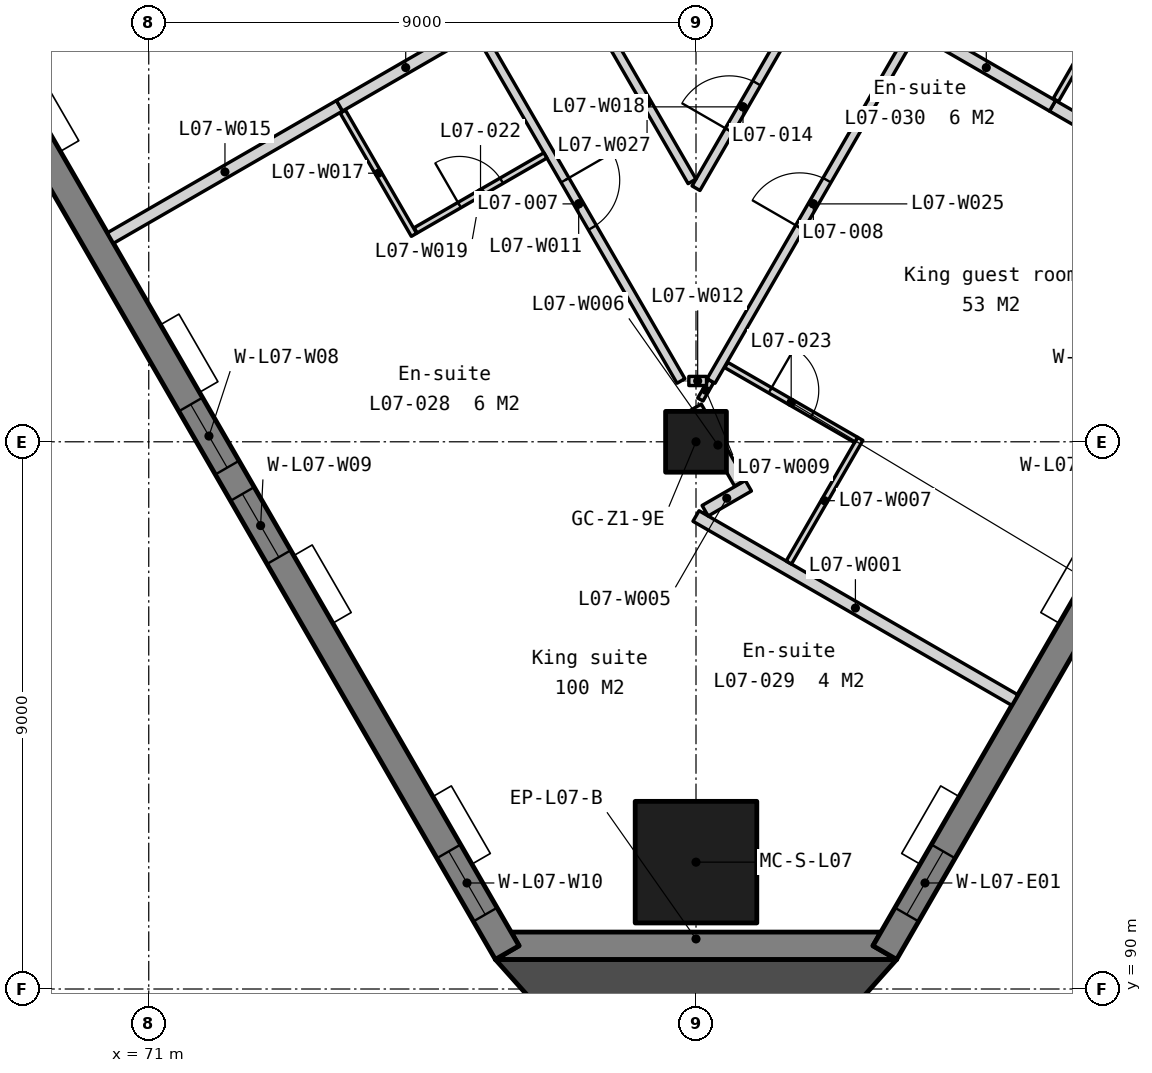
"""IFC4 building model, lengths in metres.
Left out: names, types, materials, properties, quantities, classifications, styles, units other than length and angle.
Written with IfcOpenShell. Run it as: python <this file> out.ifc"""

import sys

from ifc_helpers import new_model, si_unit, direction, frame, frame_2d, origin, origin_2d, place, context, subcontext, project, spatial, polyline, rectangle, outline, extrude, element, fill, save


model = new_model("IFC4")
c1 = context("Model", 3, precision=1e-05, world=origin(), true_north=direction((0.0, 1.0)))
c2 = subcontext(c1, "Body", "Model", "MODEL_VIEW")
j1 = project(units=[si_unit("LENGTHUNIT", "METRE"), si_unit("PLANEANGLEUNIT", "RADIAN")], contexts=[c1])
p1 = place(None, origin())
s1 = spatial("IfcSite", under=j1, at=p1, CompositionType="ELEMENT")
p2 = place(p1, origin())
s2 = spatial("IfcBuilding", under=s1, at=p2, CompositionType="ELEMENT")
p3 = place(p2, frame((0.0, 0.0, 38.5)))
s3 = spatial("IfcBuildingStorey", under=s2, at=p3, CompositionType="ELEMENT", Elevation=38.5)
p4 = place(p3, frame((80.0, 99.0, 0.0), z_axis=(0.0, 0.0, 1.0), x_axis=(1.0, 0.0, 0.0)))
e1 = element("IfcColumn", 1, at=p4, inside=s3, PredefinedType="COLUMN", context=c2, shape_type="SweptSolid", body=[
    extrude(rectangle(XDim=1.0, YDim=1.0, at=origin_2d()), origin(), (0.0, 0.0, 1.0), 3.5),
])
p5 = place(p3, frame((80.0, 92.086, 0.0), z_axis=(0.0, 0.0, 1.0), x_axis=(1.0, 0.0, 0.0)))
e2 = element("IfcColumn", 2, at=p5, inside=s3, PredefinedType="COLUMN", context=c2, shape_type="SweptSolid", body=[
    extrude(rectangle(XDim=2.0, YDim=2.0, at=origin_2d()), origin(), (0.0, 0.0, 1.0), 3.5),
])
p6 = place(p3, frame((0.0, 0.0, -0.15)))
e3 = element("IfcWall", 3, at=p6, inside=s3, PredefinedType="SOLIDWALL", context=c2, shape_type="SweptSolid", body=[
    extrude(outline(polyline([(76.7, 90.486), (77.09, 90.711), (76.96, 90.936), (83.04, 90.936), (82.91, 90.711), (83.3, 90.486), (76.7, 90.486)])), origin(), (0.0, 0.0, 1.0), 3.5),
])
p7 = place(p3, frame((54.495, 129.397, -0.15), z_axis=(0.0, 0.0, 1.0), x_axis=(0.499999201451, -0.866025864826, 0.0)))
e4 = element("IfcWall", 4, at=p7, inside=s3, PredefinedType="SOLIDWALL", context=c2, shape_type="SweptSolid", body=[
    extrude(outline(polyline([(44.8, 0.0), (44.8, 3.5), (0.0, 3.5), (0.0, 0.0), (44.8, 0.0)])), frame((0.0, 0.225, 0.0), z_axis=(0.0, -1.0, 0.0), x_axis=(1.0, 0.0, 0.0)), (0.0, 0.0, 1.0), 0.45),
])
p8 = place(p7, frame((0.722, 0.0, 1.05)))
e5 = element("IfcOpeningElement", 5, at=p8, cuts=e4, PredefinedType="OPENING", context=c2, shape_type="SweptSolid", body=[
    extrude(rectangle(XDim=1.2, YDim=1.5, at=frame_2d((0.6, 0.75))), frame((0.0, 0.235, 0.0), z_axis=(0.0, -1.0, 0.0), x_axis=(1.0, 0.0, 0.0)), (0.0, 0.0, 1.0), 0.47),
])
p9 = place(p7, frame((7.51, 0.0, 1.05)))
e6 = element("IfcOpeningElement", 6, at=p9, cuts=e4, PredefinedType="OPENING", context=c2, shape_type="SweptSolid", body=[
    extrude(rectangle(XDim=1.2, YDim=1.5, at=frame_2d((0.6, 0.75))), frame((0.0, 0.235, 0.0), z_axis=(0.0, -1.0, 0.0), x_axis=(1.0, 0.0, 0.0)), (0.0, 0.0, 1.0), 0.47),
])
p10 = place(p7, frame((9.21, 0.0, 1.05)))
e7 = element("IfcOpeningElement", 7, at=p10, cuts=e4, PredefinedType="OPENING", context=c2, shape_type="SweptSolid", body=[
    extrude(rectangle(XDim=1.2, YDim=1.5, at=frame_2d((0.6, 0.75))), frame((0.0, 0.235, 0.0), z_axis=(0.0, -1.0, 0.0), x_axis=(1.0, 0.0, 0.0)), (0.0, 0.0, 1.0), 0.47),
])
p11 = place(p7, frame((16.47, 0.0, 1.05)))
e8 = element("IfcOpeningElement", 8, at=p11, cuts=e4, PredefinedType="OPENING", context=c2, shape_type="SweptSolid", body=[
    extrude(rectangle(XDim=1.2, YDim=1.5, at=frame_2d((0.6, 0.75))), frame((0.0, 0.235, 0.0), z_axis=(0.0, -1.0, 0.0), x_axis=(1.0, 0.0, 0.0)), (0.0, 0.0, 1.0), 0.47),
])
p12 = place(p7, frame((18.17, 0.0, 1.05)))
e9 = element("IfcOpeningElement", 9, at=p12, cuts=e4, PredefinedType="OPENING", context=c2, shape_type="SweptSolid", body=[
    extrude(rectangle(XDim=1.2, YDim=1.5, at=frame_2d((0.6, 0.75))), frame((0.0, 0.235, 0.0), z_axis=(0.0, -1.0, 0.0), x_axis=(1.0, 0.0, 0.0)), (0.0, 0.0, 1.0), 0.47),
])
p13 = place(p7, frame((25.43, 0.0, 1.05)))
e10 = element("IfcOpeningElement", 10, at=p13, cuts=e4, PredefinedType="OPENING", context=c2, shape_type="SweptSolid", body=[
    extrude(rectangle(XDim=1.2, YDim=1.5, at=frame_2d((0.6, 0.75))), frame((0.0, 0.235, 0.0), z_axis=(0.0, -1.0, 0.0), x_axis=(1.0, 0.0, 0.0)), (0.0, 0.0, 1.0), 0.47),
])
p14 = place(p7, frame((27.13, 0.0, 1.05)))
e11 = element("IfcOpeningElement", 11, at=p14, cuts=e4, PredefinedType="OPENING", context=c2, shape_type="SweptSolid", body=[
    extrude(rectangle(XDim=1.2, YDim=1.5, at=frame_2d((0.6, 0.75))), frame((0.0, 0.235, 0.0), z_axis=(0.0, -1.0, 0.0), x_axis=(1.0, 0.0, 0.0)), (0.0, 0.0, 1.0), 0.47),
])
p15 = place(p7, frame((34.39, 0.0, 1.05)))
e12 = element("IfcOpeningElement", 12, at=p15, cuts=e4, PredefinedType="OPENING", context=c2, shape_type="SweptSolid", body=[
    extrude(rectangle(XDim=1.2, YDim=1.5, at=frame_2d((0.6, 0.75))), frame((0.0, 0.235, 0.0), z_axis=(0.0, -1.0, 0.0), x_axis=(1.0, 0.0, 0.0)), (0.0, 0.0, 1.0), 0.47),
])
p16 = place(p7, frame((36.09, 0.0, 1.05)))
e13 = element("IfcOpeningElement", 13, at=p16, cuts=e4, PredefinedType="OPENING", context=c2, shape_type="SweptSolid", body=[
    extrude(rectangle(XDim=1.2, YDim=1.5, at=frame_2d((0.6, 0.75))), frame((0.0, 0.235, 0.0), z_axis=(0.0, -1.0, 0.0), x_axis=(1.0, 0.0, 0.0)), (0.0, 0.0, 1.0), 0.47),
])
p17 = place(p7, frame((42.878, 0.0, 1.05)))
e14 = element("IfcOpeningElement", 14, at=p17, cuts=e4, PredefinedType="OPENING", context=c2, shape_type="SweptSolid", body=[
    extrude(rectangle(XDim=1.2, YDim=1.5, at=frame_2d((0.6, 0.75))), frame((0.0, 0.235, 0.0), z_axis=(0.0, -1.0, 0.0), x_axis=(1.0, 0.0, 0.0)), (0.0, 0.0, 1.0), 0.47),
])
p18 = place(p3, frame((83.105, 90.599, -0.15), z_axis=(0.0, 0.0, 1.0), x_axis=(0.499999201451, 0.866025864826, 0.0)))
e15 = element("IfcWall", 15, at=p18, inside=s3, PredefinedType="SOLIDWALL", context=c2, shape_type="SweptSolid", body=[
    extrude(outline(polyline([(44.8, 0.0), (44.8, 3.5), (0.0, 3.5), (0.0, 0.0), (44.8, 0.0)])), frame((0.0, 0.225, 0.0), z_axis=(0.0, -1.0, 0.0), x_axis=(1.0, 0.0, 0.0)), (0.0, 0.0, 1.0), 0.45),
])
p19 = place(p18, frame((0.722, 0.0, 1.05)))
e16 = element("IfcOpeningElement", 16, at=p19, cuts=e15, PredefinedType="OPENING", context=c2, shape_type="SweptSolid", body=[
    extrude(rectangle(XDim=1.2, YDim=1.5, at=frame_2d((0.6, 0.75))), frame((0.0, 0.235, 0.0), z_axis=(0.0, -1.0, 0.0), x_axis=(1.0, 0.0, 0.0)), (0.0, 0.0, 1.0), 0.47),
])
p20 = place(p18, frame((7.51, 0.0, 1.05)))
e17 = element("IfcOpeningElement", 17, at=p20, cuts=e15, PredefinedType="OPENING", context=c2, shape_type="SweptSolid", body=[
    extrude(rectangle(XDim=1.2, YDim=1.5, at=frame_2d((0.6, 0.75))), frame((0.0, 0.235, 0.0), z_axis=(0.0, -1.0, 0.0), x_axis=(1.0, 0.0, 0.0)), (0.0, 0.0, 1.0), 0.47),
])
p21 = place(p18, frame((9.21, 0.0, 1.05)))
e18 = element("IfcOpeningElement", 18, at=p21, cuts=e15, PredefinedType="OPENING", context=c2, shape_type="SweptSolid", body=[
    extrude(rectangle(XDim=1.2, YDim=1.5, at=frame_2d((0.6, 0.75))), frame((0.0, 0.235, 0.0), z_axis=(0.0, -1.0, 0.0), x_axis=(1.0, 0.0, 0.0)), (0.0, 0.0, 1.0), 0.47),
])
p22 = place(p18, frame((16.47, 0.0, 1.05)))
e19 = element("IfcOpeningElement", 19, at=p22, cuts=e15, PredefinedType="OPENING", context=c2, shape_type="SweptSolid", body=[
    extrude(rectangle(XDim=1.2, YDim=1.5, at=frame_2d((0.6, 0.75))), frame((0.0, 0.235, 0.0), z_axis=(0.0, -1.0, 0.0), x_axis=(1.0, 0.0, 0.0)), (0.0, 0.0, 1.0), 0.47),
])
p23 = place(p18, frame((18.17, 0.0, 1.05)))
e20 = element("IfcOpeningElement", 20, at=p23, cuts=e15, PredefinedType="OPENING", context=c2, shape_type="SweptSolid", body=[
    extrude(rectangle(XDim=1.2, YDim=1.5, at=frame_2d((0.6, 0.75))), frame((0.0, 0.235, 0.0), z_axis=(0.0, -1.0, 0.0), x_axis=(1.0, 0.0, 0.0)), (0.0, 0.0, 1.0), 0.47),
])
p24 = place(p18, frame((25.43, 0.0, 1.05)))
e21 = element("IfcOpeningElement", 21, at=p24, cuts=e15, PredefinedType="OPENING", context=c2, shape_type="SweptSolid", body=[
    extrude(rectangle(XDim=1.2, YDim=1.5, at=frame_2d((0.6, 0.75))), frame((0.0, 0.235, 0.0), z_axis=(0.0, -1.0, 0.0), x_axis=(1.0, 0.0, 0.0)), (0.0, 0.0, 1.0), 0.47),
])
p25 = place(p18, frame((27.13, 0.0, 1.05)))
e22 = element("IfcOpeningElement", 22, at=p25, cuts=e15, PredefinedType="OPENING", context=c2, shape_type="SweptSolid", body=[
    extrude(rectangle(XDim=1.2, YDim=1.5, at=frame_2d((0.6, 0.75))), frame((0.0, 0.235, 0.0), z_axis=(0.0, -1.0, 0.0), x_axis=(1.0, 0.0, 0.0)), (0.0, 0.0, 1.0), 0.47),
])
p26 = place(p18, frame((34.39, 0.0, 1.05)))
e23 = element("IfcOpeningElement", 23, at=p26, cuts=e15, PredefinedType="OPENING", context=c2, shape_type="SweptSolid", body=[
    extrude(rectangle(XDim=1.2, YDim=1.5, at=frame_2d((0.6, 0.75))), frame((0.0, 0.235, 0.0), z_axis=(0.0, -1.0, 0.0), x_axis=(1.0, 0.0, 0.0)), (0.0, 0.0, 1.0), 0.47),
])
p27 = place(p18, frame((36.09, 0.0, 1.05)))
e24 = element("IfcOpeningElement", 24, at=p27, cuts=e15, PredefinedType="OPENING", context=c2, shape_type="SweptSolid", body=[
    extrude(rectangle(XDim=1.2, YDim=1.5, at=frame_2d((0.6, 0.75))), frame((0.0, 0.235, 0.0), z_axis=(0.0, -1.0, 0.0), x_axis=(1.0, 0.0, 0.0)), (0.0, 0.0, 1.0), 0.47),
])
p28 = place(p18, frame((42.878, 0.0, 1.05)))
e25 = element("IfcOpeningElement", 25, at=p28, cuts=e15, PredefinedType="OPENING", context=c2, shape_type="SweptSolid", body=[
    extrude(rectangle(XDim=1.2, YDim=1.5, at=frame_2d((0.6, 0.75))), frame((0.0, 0.235, 0.0), z_axis=(0.0, -1.0, 0.0), x_axis=(1.0, 0.0, 0.0)), (0.0, 0.0, 1.0), 0.47),
])
p29 = place(p3, frame((0.0, 0.0, -0.15)))
e26 = element("IfcWall", 26, at=p29, inside=s3, PredefinedType="SOLIDWALL", context=c2, shape_type="SweptSolid", body=[
    extrude(outline(polyline([(76.7, 90.486), (80.0, 86.792), (83.3, 90.486), (76.7, 90.486)])), origin(), (0.0, 0.0, 1.0), 3.5),
])
p30 = place(p3, frame((80.0, 97.779, 0.0), z_axis=(0.0, 0.0, 1.0), x_axis=(0.866028448709, -0.499994725999, 0.0)))
e27 = element("IfcWall", 27, at=p30, inside=s3, PredefinedType="PARTITIONING", context=c2, shape_type="SweptSolid", body=[
    extrude(rectangle(XDim=6.054, YDim=0.2, at=frame_2d((3.027, 0.0))), origin(), (0.0, 0.0, 1.0), 3.35),
])
p31 = place(p3, frame((80.15, 97.866, 0.0), z_axis=(0.0, 0.0, 1.0), x_axis=(0.86609656662, 0.499876722092, 0.0)))
e28 = element("IfcWall", 28, at=p31, inside=s3, PredefinedType="PARTITIONING", context=c2, shape_type="SweptSolid", body=[
    extrude(rectangle(XDim=0.822, YDim=0.2, at=frame_2d((0.411, 0.0))), origin(), (0.0, 0.0, 1.0), 3.35),
])
p32 = place(p3, frame((80.0, 99.571, 0.0), z_axis=(0.0, 0.0, 1.0), x_axis=(0.499673574751, -0.866213783483, 0.0)))
e29 = element("IfcWall", 29, at=p32, inside=s3, PredefinedType="PARTITIONING", context=c2, shape_type="SweptSolid", body=[
    extrude(rectangle(XDim=1.441, YDim=0.2, at=frame_2d((0.721, 0.0))), origin(), (0.0, 0.0, 1.0), 3.35),
])
p33 = place(p3, frame((81.526, 97.014, 0.0), z_axis=(0.0, 0.0, 1.0), x_axis=(0.499938297808, 0.866061024631, 0.0)))
e30 = element("IfcWall", 30, at=p33, inside=s3, PredefinedType="PARTITIONING", context=c2, shape_type="SweptSolid", body=[
    extrude(rectangle(XDim=2.35, YDim=0.1, at=frame_2d((1.175, 0.0))), origin(), (0.0, 0.0, 1.0), 3.35),
])
p34 = place(p3, frame((80.072, 99.696, 0.0), z_axis=(0.0, 0.0, 1.0), x_axis=(0.500023029176, 0.866012107475, 0.0)))
e31 = element("IfcWall", 31, at=p34, inside=s3, PredefinedType="PARTITIONING", context=c2, shape_type="SweptSolid", body=[
    extrude(rectangle(XDim=0.352, YDim=0.1, at=frame_2d((0.176, 0.0))), origin(), (0.0, 0.0, 1.0), 3.35),
])
p35 = place(p3, frame((76.389, 105.826, 0.0), z_axis=(0.0, 0.0, 1.0), x_axis=(0.500034510166, -0.866005478414, 0.0)))
e32 = element("IfcWall", 32, at=p35, inside=s3, PredefinedType="PARTITIONING", context=c2, shape_type="SweptSolid", body=[
    extrude(rectangle(XDim=6.727, YDim=0.15, at=frame_2d((3.364, 0.0))), origin(), (0.0, 0.0, 1.0), 3.35),
])
p36 = place(p35, frame((2.914, 0.0, 0.0)))
e33 = element("IfcOpeningElement", 33, at=p36, cuts=e32, PredefinedType="OPENING", context=c2, shape_type="SweptSolid", body=[
    extrude(rectangle(XDim=0.9, YDim=2.1, at=frame_2d((0.45, 1.05))), frame((0.0, 0.085, 0.0), z_axis=(0.0, -1.0, 0.0), x_axis=(1.0, 0.0, 0.0)), (0.0, 0.0, 1.0), 0.17),
])
p37 = place(p3, frame((79.882, 100.0, 0.0), z_axis=(0.0, 0.0, 1.0), x_axis=(1.0, 0.0, 0.0)))
e34 = element("IfcWall", 34, at=p37, inside=s3, PredefinedType="PARTITIONING", context=c2, shape_type="SweptSolid", body=[
    extrude(rectangle(XDim=0.291, YDim=0.15, at=frame_2d((0.145, 0.0))), origin(), (0.0, 0.0, 1.0), 3.35),
])
p38 = place(p3, frame((80.498, 100.263, 0.0), z_axis=(0.0, 0.0, 1.0), x_axis=(0.866040446274, -0.499973944738, 0.0)))
e35 = element("IfcWall", 35, at=p38, inside=s3, PredefinedType="PARTITIONING", context=c2, shape_type="SweptSolid", body=[
    extrude(rectangle(XDim=2.465, YDim=0.1, at=frame_2d((1.232, 0.0))), origin(), (0.0, 0.0, 1.0), 3.35),
])
p39 = place(p38, frame((0.833, 0.0, 0.0)))
e36 = element("IfcOpeningElement", 36, at=p39, cuts=e35, PredefinedType="OPENING", context=c2, shape_type="SweptSolid", body=[
    extrude(rectangle(XDim=0.8, YDim=2.1, at=frame_2d((0.4, 1.05))), frame((0.0, 0.06, 0.0), z_axis=(0.0, -1.0, 0.0), x_axis=(1.0, 0.0, 0.0)), (0.0, 0.0, 1.0), 0.12),
])
for number, where, z_axis, x_axis in (
    (37, (70.37, 102.351, 0.0), (0.0, 0.0, 1.0), (0.866, 0.5, 0.0)),
    (38, (85.863, 104.526, 0.0), (0.0, 0.0, 1.0), (0.866, -0.5, 0.0)),
):
    element("IfcWall", number, at=place(p3, frame(where, z_axis=z_axis, x_axis=x_axis)), inside=s3, PredefinedType="PARTITIONING", context=c2, shape_type="SweptSolid", body=[
        extrude(rectangle(XDim=4.35, YDim=0.2, at=frame_2d((2.175, 0.0))), origin(), (0.0, 0.0, 1.0), 3.35),
    ])
p40 = place(p3, frame((74.192, 104.43, 0.0), z_axis=(0.0, 0.0, 1.0), x_axis=(0.499954256575, -0.866051812152, 0.0)))
e39 = element("IfcWall", 39, at=p40, inside=s3, PredefinedType="PARTITIONING", context=c2, shape_type="SweptSolid", body=[
    extrude(rectangle(XDim=2.34, YDim=0.1, at=frame_2d((1.17, 0.0))), origin(), (0.0, 0.0, 1.0), 3.35),
])
p41 = place(p3, frame((80.0, 103.17, 0.0), z_axis=(0.0, 0.0, 1.0), x_axis=(0.499980071345, 0.866036909293, 0.0)))
e40 = element("IfcWall", 40, at=p41, inside=s3, PredefinedType="PARTITIONING", context=c2, shape_type="SweptSolid", body=[
    extrude(rectangle(XDim=3.09, YDim=0.15, at=frame_2d((1.545, 0.0))), origin(), (0.0, 0.0, 1.0), 3.35),
])
p42 = place(p41, frame((1.095, 0.0, 0.0)))
e41 = element("IfcOpeningElement", 41, at=p42, cuts=e40, PredefinedType="OPENING", context=c2, shape_type="SweptSolid", body=[
    extrude(rectangle(XDim=0.9, YDim=2.1, at=frame_2d((0.45, 1.05))), frame((0.0, 0.085, 0.0), z_axis=(0.0, -1.0, 0.0), x_axis=(1.0, 0.0, 0.0)), (0.0, 0.0, 1.0), 0.17),
])
p43 = place(p3, frame((75.389, 102.477, 0.0), z_axis=(0.0, 0.0, 1.0), x_axis=(0.866040446274, 0.499973944738, 0.0)))
e42 = element("IfcWall", 42, at=p43, inside=s3, PredefinedType="PARTITIONING", context=c2, shape_type="SweptSolid", body=[
    extrude(rectangle(XDim=2.465, YDim=0.1, at=frame_2d((1.232, 0.0))), origin(), (0.0, 0.0, 1.0), 3.35),
])
p44 = place(p43, frame((0.833, 0.0, 0.0)))
e43 = element("IfcOpeningElement", 43, at=p44, cuts=e42, PredefinedType="OPENING", context=c2, shape_type="SweptSolid", body=[
    extrude(rectangle(XDim=0.8, YDim=2.1, at=frame_2d((0.4, 1.05))), frame((0.0, 0.06, 0.0), z_axis=(0.0, -1.0, 0.0), x_axis=(1.0, 0.0, 0.0)), (0.0, 0.0, 1.0), 0.12),
])
for number, where, z_axis, x_axis in (
    (44, (83.685, 105.783, 0.0), (0.0, 0.0, 1.0), (0.866, -0.5, 0.0)),
    (45, (74.137, 104.526, 0.0), (0.0, 0.0, 1.0), (0.866, 0.5, 0.0)),
):
    element("IfcWall", number, at=place(p3, frame(where, z_axis=z_axis, x_axis=x_axis)), inside=s3, PredefinedType="PARTITIONING", context=c2, shape_type="SweptSolid", body=[
        extrude(rectangle(XDim=2.515, YDim=0.2, at=frame_2d((1.257, 0.0))), origin(), (0.0, 0.0, 1.0), 3.35),
    ])
p45 = place(p3, frame((80.248, 100.0, 0.0), z_axis=(0.0, 0.0, 1.0), x_axis=(0.499980071345, 0.866036909293, 0.0)))
e46 = element("IfcWall", 46, at=p45, inside=s3, PredefinedType="PARTITIONING", context=c2, shape_type="SweptSolid", body=[
    extrude(rectangle(XDim=6.727, YDim=0.15, at=frame_2d((3.363, 0.0))), origin(), (0.0, 0.0, 1.0), 3.35),
])
p46 = place(p45, frame((2.914, 0.0, 0.0)))
e47 = element("IfcOpeningElement", 47, at=p46, cuts=e46, PredefinedType="OPENING", context=c2, shape_type="SweptSolid", body=[
    extrude(rectangle(XDim=0.9, YDim=2.1, at=frame_2d((0.45, 1.05))), frame((0.0, 0.085, 0.0), z_axis=(0.0, -1.0, 0.0), x_axis=(1.0, 0.0, 0.0)), (0.0, 0.0, 1.0), 0.17),
])
p47 = place(p3, frame((78.455, 105.846, 0.0), z_axis=(0.0, 0.0, 1.0), x_axis=(0.499988999718, -0.866031754707, 0.0)))
e48 = element("IfcWall", 48, at=p47, inside=s3, PredefinedType="PARTITIONING", context=c2, shape_type="SweptSolid", body=[
    extrude(rectangle(XDim=2.96, YDim=0.15, at=frame_2d((1.48, 0.0))), origin(), (0.0, 0.0, 1.0), 3.35),
])
p48 = place(p3, frame((85.918, 104.621, 0.0), z_axis=(0.0, 0.0, 1.0), x_axis=(0.500032503492, 0.866006637072, 0.0)))
e49 = element("IfcWall", 49, at=p48, inside=s3, PredefinedType="PARTITIONING", context=c2, shape_type="SweptSolid", body=[
    extrude(rectangle(XDim=2.34, YDim=0.1, at=frame_2d((1.17, 0.0))), origin(), (0.0, 0.0, 1.0), 3.35),
])
p49 = place(p15, origin())
e50 = element("IfcWindow", 50, at=p49, inside=s3, PartitioningType="SINGLE_PANEL", PredefinedType="WINDOW", context=c2, shape_type="SweptSolid", body=[
    extrude(rectangle(XDim=1.2, YDim=1.5, at=frame_2d((0.6, 0.75))), frame((0.0, 0.03, 0.0), z_axis=(0.0, -1.0, 0.0), x_axis=(1.0, 0.0, 0.0)), (0.0, 0.0, 1.0), 0.06),
])
fill(e12, e50)
p50 = place(p16, origin())
e51 = element("IfcWindow", 51, at=p50, inside=s3, PartitioningType="SINGLE_PANEL", PredefinedType="WINDOW", context=c2, shape_type="SweptSolid", body=[
    extrude(rectangle(XDim=1.2, YDim=1.5, at=frame_2d((0.6, 0.75))), frame((0.0, 0.03, 0.0), z_axis=(0.0, -1.0, 0.0), x_axis=(1.0, 0.0, 0.0)), (0.0, 0.0, 1.0), 0.06),
])
fill(e13, e51)
p51 = place(p17, origin())
e52 = element("IfcWindow", 52, at=p51, inside=s3, PartitioningType="SINGLE_PANEL", PredefinedType="WINDOW", context=c2, shape_type="SweptSolid", body=[
    extrude(rectangle(XDim=1.2, YDim=1.5, at=frame_2d((0.6, 0.75))), frame((0.0, 0.03, 0.0), z_axis=(0.0, -1.0, 0.0), x_axis=(1.0, 0.0, 0.0)), (0.0, 0.0, 1.0), 0.06),
])
fill(e14, e52)
p52 = place(p19, origin())
e53 = element("IfcWindow", 53, at=p52, inside=s3, PartitioningType="SINGLE_PANEL", PredefinedType="WINDOW", context=c2, shape_type="SweptSolid", body=[
    extrude(rectangle(XDim=1.2, YDim=1.5, at=frame_2d((0.6, 0.75))), frame((0.0, 0.03, 0.0), z_axis=(0.0, -1.0, 0.0), x_axis=(1.0, 0.0, 0.0)), (0.0, 0.0, 1.0), 0.06),
])
fill(e16, e53)
p53 = place(p36, origin())
e54 = element("IfcDoor", 54, at=p53, inside=s3, OperationType="SINGLE_SWING_LEFT", PredefinedType="DOOR", context=c2, shape_type="SweptSolid", body=[
    extrude(rectangle(XDim=0.9, YDim=2.1, at=frame_2d((0.45, 1.05))), frame((0.0, 0.025, 0.0), z_axis=(0.0, -1.0, 0.0), x_axis=(1.0, 0.0, 0.0)), (0.0, 0.0, 1.0), 0.05),
])
fill(e33, e54)
p54 = place(p46, origin())
e55 = element("IfcDoor", 55, at=p54, inside=s3, OperationType="SINGLE_SWING_LEFT", PredefinedType="DOOR", context=c2, shape_type="SweptSolid", body=[
    extrude(rectangle(XDim=0.9, YDim=2.1, at=frame_2d((0.45, 1.05))), frame((0.0, 0.025, 0.0), z_axis=(0.0, -1.0, 0.0), x_axis=(1.0, 0.0, 0.0)), (0.0, 0.0, 1.0), 0.05),
])
fill(e47, e55)
p55 = place(p42, origin())
e56 = element("IfcDoor", 56, at=p55, inside=s3, OperationType="SINGLE_SWING_LEFT", PredefinedType="DOOR", context=c2, shape_type="SweptSolid", body=[
    extrude(rectangle(XDim=0.9, YDim=2.1, at=frame_2d((0.45, 1.05))), frame((0.0, 0.025, 0.0), z_axis=(0.0, -1.0, 0.0), x_axis=(1.0, 0.0, 0.0)), (0.0, 0.0, 1.0), 0.05),
])
fill(e41, e56)
p56 = place(p44, origin())
e57 = element("IfcDoor", 57, at=p56, inside=s3, OperationType="SINGLE_SWING_LEFT", PredefinedType="DOOR", context=c2, shape_type="SweptSolid", body=[
    extrude(rectangle(XDim=0.8, YDim=2.1, at=frame_2d((0.4, 1.05))), frame((0.0, 0.025, 0.0), z_axis=(0.0, -1.0, 0.0), x_axis=(1.0, 0.0, 0.0)), (0.0, 0.0, 1.0), 0.05),
])
fill(e43, e57)
p57 = place(p39, origin())
e58 = element("IfcDoor", 58, at=p57, inside=s3, OperationType="SINGLE_SWING_LEFT", PredefinedType="DOOR", context=c2, shape_type="SweptSolid", body=[
    extrude(rectangle(XDim=0.8, YDim=2.1, at=frame_2d((0.4, 1.05))), frame((0.0, 0.025, 0.0), z_axis=(0.0, -1.0, 0.0), x_axis=(1.0, 0.0, 0.0)), (0.0, 0.0, 1.0), 0.05),
])
fill(e36, e58)
save(model, sys.argv[1])
